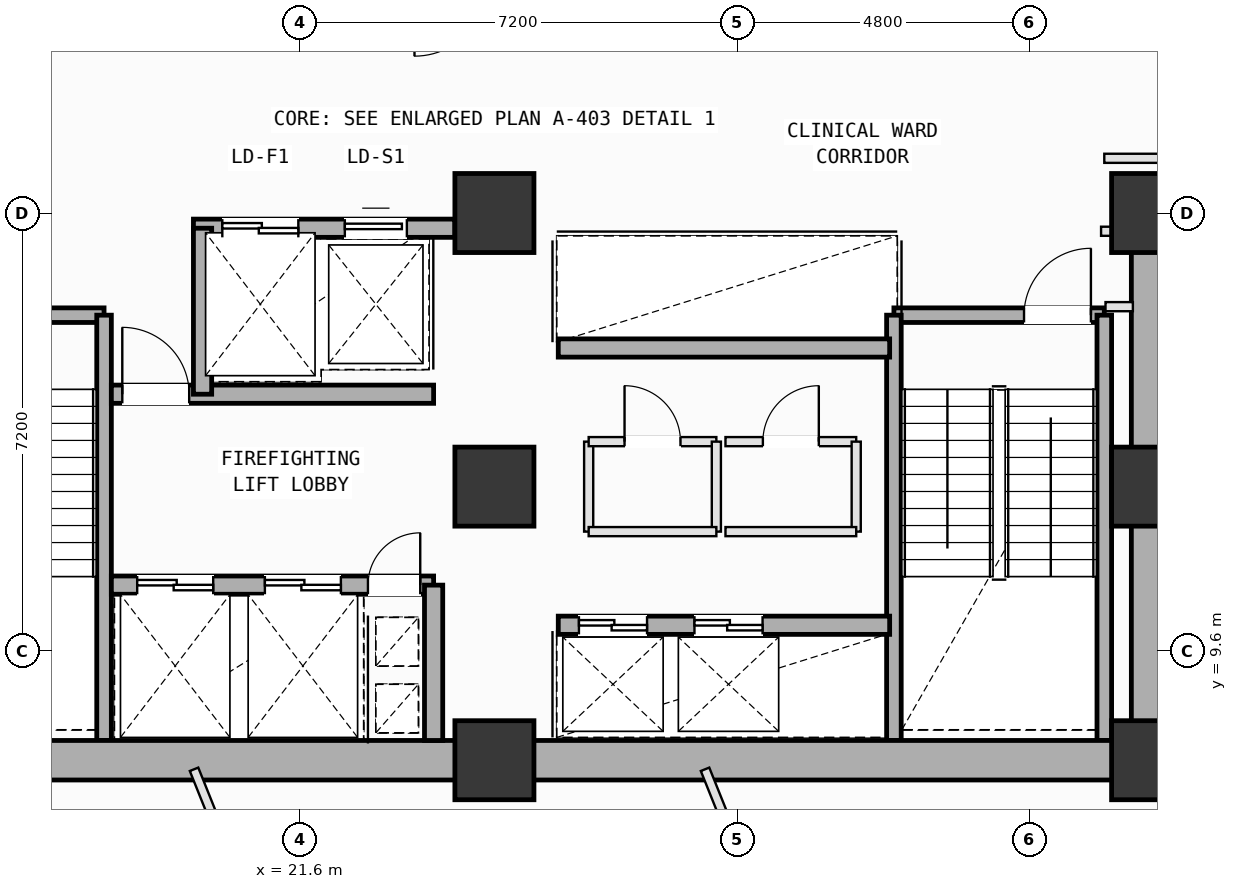
"""IFC4 building model, lengths in metres.
Left out: names, types, materials, properties, quantities, classifications, styles, units other than length and angle.
Written with IfcOpenShell. Run it as: python <this file> out.ifc"""

import sys

from ifc_helpers import new_model, si_unit, direction, frame, frame_2d, origin, origin_2d, place, context, subcontext, project, spatial, rectangle, extrude, element, fill, save


model = new_model("IFC4")
c1 = context("Model", 3, precision=1e-05, world=origin(), true_north=direction((0.0, 1.0)))
c2 = subcontext(c1, "Body", "Model", "MODEL_VIEW")
j1 = project(units=[si_unit("LENGTHUNIT", "METRE"), si_unit("PLANEANGLEUNIT", "RADIAN")], contexts=[c1])
p1 = place(None, origin())
s1 = spatial("IfcSite", under=j1, at=p1, CompositionType="ELEMENT")
p2 = place(p1, origin())
s2 = spatial("IfcBuilding", under=s1, at=p2, CompositionType="ELEMENT")
p3 = place(p2, frame((0.0, 0.0, 116.4)))
s3 = spatial("IfcBuildingStorey", under=s2, at=p3, CompositionType="ELEMENT", Elevation=116.4)
for number, where, z_axis, x_axis in (
    (1, (24.8, 7.8, 0.0), (0.0, 0.0, 1.0), (1.0, 0.0, 0.0)),
    (2, (24.8, 12.3, 0.0), (0.0, 0.0, 1.0), (1.0, 0.0, 0.0)),
    (3, (24.8, 16.8, 0.0), (0.0, 0.0, 1.0), (1.0, 0.0, 0.0)),
    (4, (35.6, 7.8, 0.0), (0.0, 0.0, 1.0), (1.0, 0.0, 0.0)),
    (5, (35.6, 12.3, 0.0), (0.0, 0.0, 1.0), (1.0, 0.0, 0.0)),
    (6, (35.6, 16.8, 0.0), (0.0, 0.0, 1.0), (1.0, 0.0, 0.0)),
):
    element("IfcColumn", number, at=place(p3, frame(where, z_axis=z_axis, x_axis=x_axis)), inside=s3, PredefinedType="COLUMN", context=c2, shape_type="SweptSolid", body=[
        extrude(rectangle(XDim=1.3, YDim=1.3, at=origin_2d()), origin(), (0.0, 0.0, 1.0), 4.0),
    ])
p4 = place(p3, frame((14.92, 15.12, 0.0), z_axis=(0.0, 0.0, 1.0), x_axis=(1.0, 0.0, 0.0)))
e7 = element("IfcWall", 7, at=p4, inside=s3, PredefinedType="SOLIDWALL", context=c2, shape_type="SweptSolid", body=[
    extrude(rectangle(XDim=3.46, YDim=0.24, at=frame_2d((1.73, 0.0))), origin(), (0.0, 0.0, 1.0), 3.78),
])
p5 = place(p4, frame((0.22, 0.0, 0.0)))
e8 = element("IfcOpeningElement", 8, at=p5, cuts=e7, PredefinedType="OPENING", context=c2, shape_type="SweptSolid", body=[
    extrude(rectangle(XDim=1.1, YDim=2.15, at=frame_2d((0.55, 1.075))), frame((0.0, 0.13, 0.0), z_axis=(0.0, -1.0, 0.0), x_axis=(1.0, 0.0, 0.0)), (0.0, 0.0, 1.0), 0.26),
])
p6 = place(p3, frame((18.38, 15.12, 0.0), z_axis=(0.0, 0.0, 1.0), x_axis=(0.0, -1.0, 0.0)))
e9 = element("IfcWall", 9, at=p6, inside=s3, PredefinedType="SOLIDWALL", context=c2, shape_type="SweptSolid", body=[
    extrude(rectangle(XDim=6.995, YDim=0.24, at=frame_2d((3.498, 0.0))), origin(), (0.0, 0.0, 1.0), 3.78),
])
p7 = place(p3, frame((31.37, 15.12, 0.0), z_axis=(0.0, 0.0, 1.0), x_axis=(1.0, 0.0, 0.0)))
e10 = element("IfcWall", 10, at=p7, inside=s3, PredefinedType="SOLIDWALL", context=c2, shape_type="SweptSolid", body=[
    extrude(rectangle(XDim=3.46, YDim=0.24, at=frame_2d((1.73, 0.0))), origin(), (0.0, 0.0, 1.0), 3.78),
])
p8 = place(p7, frame((2.14, 0.0, 0.0)))
e11 = element("IfcOpeningElement", 11, at=p8, cuts=e10, PredefinedType="OPENING", context=c2, shape_type="SweptSolid", body=[
    extrude(rectangle(XDim=1.1, YDim=2.15, at=frame_2d((0.55, 1.075))), frame((0.0, 0.13, 0.0), z_axis=(0.0, -1.0, 0.0), x_axis=(1.0, 0.0, 0.0)), (0.0, 0.0, 1.0), 0.26),
])
for number, where, z_axis, x_axis in (
    (12, (34.83, 15.12, 0.0), (0.0, 0.0, 1.0), (0.0, -1.0, 0.0)),
    (13, (31.37, 8.125, 0.0), (0.0, 0.0, 1.0), (0.0, 1.0, 0.0)),
):
    element("IfcWall", number, at=place(p3, frame(where, z_axis=z_axis, x_axis=x_axis)), inside=s3, PredefinedType="SOLIDWALL", context=c2, shape_type="SweptSolid", body=[
        extrude(rectangle(XDim=6.995, YDim=0.24, at=frame_2d((3.498, 0.0))), origin(), (0.0, 0.0, 1.0), 3.78),
    ])
for number, where, z_axis, x_axis in (
    (14, (14.0, 7.8, 0.0), (0.0, 0.0, 1.0), (1.0, 0.0, 0.0)),
    (15, (24.8, 7.8, 0.0), (0.0, 0.0, 1.0), (1.0, 0.0, 0.0)),
):
    element("IfcWall", number, at=place(p3, frame(where, z_axis=z_axis, x_axis=x_axis)), inside=s3, PredefinedType="SHEAR", context=c2, shape_type="SweptSolid", body=[
        extrude(rectangle(XDim=10.8, YDim=0.65, at=frame_2d((5.4, 0.0))), origin(), (0.0, 0.0, 1.0), 3.78),
    ])
p9 = place(p3, frame((35.6, 7.8, 0.0), z_axis=(0.0, 0.0, 1.0), x_axis=(0.0, 1.0, 0.0)))
e16 = element("IfcWall", 16, at=p9, inside=s3, PredefinedType="SHEAR", context=c2, shape_type="SweptSolid", body=[
    extrude(rectangle(XDim=9.0, YDim=0.65, at=frame_2d((4.5, 0.0))), origin(), (0.0, 0.0, 1.0), 3.78),
])
p10 = place(p3, frame((19.85, 16.55, 0.0), z_axis=(0.0, 0.0, 1.0), x_axis=(1.0, 0.0, 0.0)))
e17 = element("IfcWall", 17, at=p10, inside=s3, PredefinedType="SOLIDWALL", context=c2, shape_type="SweptSolid", body=[
    extrude(rectangle(XDim=4.3, YDim=0.3, at=frame_2d((2.15, 0.0))), origin(), (0.0, 0.0, 1.0), 3.78),
])
p11 = place(p10, frame((0.475, 0.0, 0.0)))
e18 = element("IfcOpeningElement", 18, at=p11, cuts=e17, PredefinedType="OPENING", context=c2, shape_type="SweptSolid", body=[
    extrude(rectangle(XDim=1.25, YDim=2.18, at=frame_2d((0.625, 1.09))), frame((0.0, 0.16, 0.0), z_axis=(0.0, -1.0, 0.0), x_axis=(1.0, 0.0, 0.0)), (0.0, 0.0, 1.0), 0.32),
])
p12 = place(p10, frame((2.49, 0.0, 0.0)))
e19 = element("IfcOpeningElement", 19, at=p12, cuts=e17, PredefinedType="OPENING", context=c2, shape_type="SweptSolid", body=[
    extrude(rectangle(XDim=1.02, YDim=2.12, at=frame_2d((0.51, 1.06))), frame((0.0, 0.16, 0.0), z_axis=(0.0, -1.0, 0.0), x_axis=(1.0, 0.0, 0.0)), (0.0, 0.0, 1.0), 0.32),
])
p13 = place(p3, frame((18.5, 10.68, 0.0), z_axis=(0.0, 0.0, 1.0), x_axis=(1.0, 0.0, 0.0)))
e20 = element("IfcWall", 20, at=p13, inside=s3, PredefinedType="SOLIDWALL", context=c2, shape_type="SweptSolid", body=[
    extrude(rectangle(XDim=5.3, YDim=0.3, at=frame_2d((2.65, 0.0))), origin(), (0.0, 0.0, 1.0), 3.78),
])
p14 = place(p13, frame((4.22, 0.0, 0.0)))
e21 = element("IfcOpeningElement", 21, at=p14, cuts=e20, PredefinedType="OPENING", context=c2, shape_type="SweptSolid", body=[
    extrude(rectangle(XDim=0.86, YDim=2.06, at=frame_2d((0.43, 1.03))), frame((0.0, 0.16, 0.0), z_axis=(0.0, -1.0, 0.0), x_axis=(1.0, 0.0, 0.0)), (0.0, 0.0, 1.0), 0.32),
])
p15 = place(p13, frame((0.425, 0.0, 0.0)))
e22 = element("IfcOpeningElement", 22, at=p15, cuts=e20, PredefinedType="OPENING", context=c2, shape_type="SweptSolid", body=[
    extrude(rectangle(XDim=1.25, YDim=2.18, at=frame_2d((0.625, 1.09))), frame((0.0, 0.16, 0.0), z_axis=(0.0, -1.0, 0.0), x_axis=(1.0, 0.0, 0.0)), (0.0, 0.0, 1.0), 0.32),
])
p16 = place(p13, frame((2.525, 0.0, 0.0)))
e23 = element("IfcOpeningElement", 23, at=p16, cuts=e20, PredefinedType="OPENING", context=c2, shape_type="SweptSolid", body=[
    extrude(rectangle(XDim=1.25, YDim=2.18, at=frame_2d((0.625, 1.09))), frame((0.0, 0.16, 0.0), z_axis=(0.0, -1.0, 0.0), x_axis=(1.0, 0.0, 0.0)), (0.0, 0.0, 1.0), 0.32),
])
p17 = place(p3, frame((18.5, 13.82, 0.0), z_axis=(0.0, 0.0, 1.0), x_axis=(1.0, 0.0, 0.0)))
e24 = element("IfcWall", 24, at=p17, inside=s3, PredefinedType="SOLIDWALL", context=c2, shape_type="SweptSolid", body=[
    extrude(rectangle(XDim=5.3, YDim=0.3, at=frame_2d((2.65, 0.0))), origin(), (0.0, 0.0, 1.0), 3.78),
])
p18 = place(p17, frame((0.18, 0.0, 0.0)))
e25 = element("IfcOpeningElement", 25, at=p18, cuts=e24, PredefinedType="OPENING", context=c2, shape_type="SweptSolid", body=[
    extrude(rectangle(XDim=1.1, YDim=2.15, at=frame_2d((0.55, 1.075))), frame((0.0, 0.16, 0.0), z_axis=(0.0, -1.0, 0.0), x_axis=(1.0, 0.0, 0.0)), (0.0, 0.0, 1.0), 0.32),
])
p19 = place(p3, frame((23.8, 8.125, 0.0), z_axis=(0.0, 0.0, 1.0), x_axis=(0.0, 1.0, 0.0)))
e26 = element("IfcWall", 26, at=p19, inside=s3, PredefinedType="SOLIDWALL", context=c2, shape_type="SweptSolid", body=[
    extrude(rectangle(XDim=2.555, YDim=0.3, at=frame_2d((1.277, 0.0))), origin(), (0.0, 0.0, 1.0), 3.78),
])
p20 = place(p3, frame((20.0, 13.82, 0.0), z_axis=(0.0, 0.0, 1.0), x_axis=(0.0, 1.0, 0.0)))
e27 = element("IfcWall", 27, at=p20, inside=s3, PredefinedType="SOLIDWALL", context=c2, shape_type="SweptSolid", body=[
    extrude(rectangle(XDim=2.73, YDim=0.3, at=frame_2d((1.365, 0.0))), origin(), (0.0, 0.0, 1.0), 3.78),
])
p21 = place(p3, frame((25.85, 10.02, 0.0), z_axis=(0.0, 0.0, 1.0), x_axis=(1.0, 0.0, 0.0)))
e28 = element("IfcWall", 28, at=p21, inside=s3, PredefinedType="SOLIDWALL", context=c2, shape_type="SweptSolid", body=[
    extrude(rectangle(XDim=5.45, YDim=0.3, at=frame_2d((2.725, 0.0))), origin(), (0.0, 0.0, 1.0), 3.78),
])
p22 = place(p21, frame((0.34, 0.0, 0.0)))
e29 = element("IfcOpeningElement", 29, at=p22, cuts=e28, PredefinedType="OPENING", context=c2, shape_type="SweptSolid", body=[
    extrude(rectangle(XDim=1.12, YDim=2.15, at=frame_2d((0.56, 1.075))), frame((0.0, 0.16, 0.0), z_axis=(0.0, -1.0, 0.0), x_axis=(1.0, 0.0, 0.0)), (0.0, 0.0, 1.0), 0.32),
])
p23 = place(p21, frame((2.24, 0.0, 0.0)))
e30 = element("IfcOpeningElement", 30, at=p23, cuts=e28, PredefinedType="OPENING", context=c2, shape_type="SweptSolid", body=[
    extrude(rectangle(XDim=1.12, YDim=2.15, at=frame_2d((0.56, 1.075))), frame((0.0, 0.16, 0.0), z_axis=(0.0, -1.0, 0.0), x_axis=(1.0, 0.0, 0.0)), (0.0, 0.0, 1.0), 0.32),
])
p24 = place(p3, frame((25.85, 14.58, 0.0), z_axis=(0.0, 0.0, 1.0), x_axis=(1.0, 0.0, 0.0)))
e31 = element("IfcWall", 31, at=p24, inside=s3, PredefinedType="SOLIDWALL", context=c2, shape_type="SweptSolid", body=[
    extrude(rectangle(XDim=5.45, YDim=0.3, at=frame_2d((2.725, 0.0))), origin(), (0.0, 0.0, 1.0), 3.78),
])
p25 = place(p3, frame((26.35, 11.56, 0.0), z_axis=(0.0, 0.0, 1.0), x_axis=(0.0, 1.0, 0.0)))
e32 = element("IfcWall", 32, at=p25, inside=s3, PredefinedType="PARTITIONING", context=c2, shape_type="SweptSolid", body=[
    extrude(rectangle(XDim=1.48, YDim=0.15, at=frame_2d((0.74, 0.0))), origin(), (0.0, 0.0, 1.0), 3.78),
])
p26 = place(p3, frame((26.35, 13.04, 0.0), z_axis=(0.0, 0.0, 1.0), x_axis=(1.0, 0.0, 0.0)))
e33 = element("IfcWall", 33, at=p26, inside=s3, PredefinedType="PARTITIONING", context=c2, shape_type="SweptSolid", body=[
    extrude(rectangle(XDim=2.1, YDim=0.15, at=frame_2d((1.05, 0.0))), origin(), (0.0, 0.0, 1.0), 3.78),
])
p27 = place(p26, frame((0.59, 0.0, 0.0)))
e34 = element("IfcOpeningElement", 34, at=p27, cuts=e33, PredefinedType="OPENING", context=c2, shape_type="SweptSolid", body=[
    extrude(rectangle(XDim=0.92, YDim=2.1, at=frame_2d((0.46, 1.05))), frame((0.0, 0.085, 0.0), z_axis=(0.0, -1.0, 0.0), x_axis=(1.0, 0.0, 0.0)), (0.0, 0.0, 1.0), 0.17),
])
p28 = place(p3, frame((28.45, 13.04, 0.0), z_axis=(0.0, 0.0, 1.0), x_axis=(0.0, -1.0, 0.0)))
e35 = element("IfcWall", 35, at=p28, inside=s3, PredefinedType="PARTITIONING", context=c2, shape_type="SweptSolid", body=[
    extrude(rectangle(XDim=1.48, YDim=0.15, at=frame_2d((0.74, 0.0))), origin(), (0.0, 0.0, 1.0), 3.78),
])
p29 = place(p3, frame((28.45, 11.56, 0.0), z_axis=(0.0, 0.0, 1.0), x_axis=(-1.0, 0.0, 0.0)))
e36 = element("IfcWall", 36, at=p29, inside=s3, PredefinedType="PARTITIONING", context=c2, shape_type="SweptSolid", body=[
    extrude(rectangle(XDim=2.1, YDim=0.15, at=frame_2d((1.05, 0.0))), origin(), (0.0, 0.0, 1.0), 3.78),
])
p30 = place(p3, frame((28.6, 13.04, 0.0), z_axis=(0.0, 0.0, 1.0), x_axis=(1.0, 0.0, 0.0)))
e37 = element("IfcWall", 37, at=p30, inside=s3, PredefinedType="PARTITIONING", context=c2, shape_type="SweptSolid", body=[
    extrude(rectangle(XDim=2.15, YDim=0.15, at=frame_2d((1.075, 0.0))), origin(), (0.0, 0.0, 1.0), 3.78),
])
p31 = place(p30, frame((0.615, 0.0, 0.0)))
e38 = element("IfcOpeningElement", 38, at=p31, cuts=e37, PredefinedType="OPENING", context=c2, shape_type="SweptSolid", body=[
    extrude(rectangle(XDim=0.92, YDim=2.1, at=frame_2d((0.46, 1.05))), frame((0.0, 0.085, 0.0), z_axis=(0.0, -1.0, 0.0), x_axis=(1.0, 0.0, 0.0)), (0.0, 0.0, 1.0), 0.17),
])
p32 = place(p3, frame((30.75, 13.04, 0.0), z_axis=(0.0, 0.0, 1.0), x_axis=(0.0, -1.0, 0.0)))
e39 = element("IfcWall", 39, at=p32, inside=s3, PredefinedType="PARTITIONING", context=c2, shape_type="SweptSolid", body=[
    extrude(rectangle(XDim=1.48, YDim=0.15, at=frame_2d((0.74, 0.0))), origin(), (0.0, 0.0, 1.0), 3.78),
])
p33 = place(p3, frame((30.75, 11.56, 0.0), z_axis=(0.0, 0.0, 1.0), x_axis=(-1.0, 0.0, 0.0)))
e40 = element("IfcWall", 40, at=p33, inside=s3, PredefinedType="PARTITIONING", context=c2, shape_type="SweptSolid", body=[
    extrude(rectangle(XDim=2.15, YDim=0.15, at=frame_2d((1.075, 0.0))), origin(), (0.0, 0.0, 1.0), 3.78),
])
p34 = place(p3, frame((19.86, 7.651, 0.0), z_axis=(0.0, 0.0, 1.0), x_axis=(0.372186898662, -0.928157805798, 0.0)))
e41 = element("IfcWall", 41, at=p34, inside=s3, PredefinedType="PARTITIONING", context=c2, shape_type="SweptSolid", body=[
    extrude(rectangle(XDim=11.312, YDim=0.15, at=frame_2d((5.656, 0.0))), origin(), (0.0, 0.0, 1.0), 3.78),
])
p35 = place(p34, frame((5.388, 0.0, 0.0)))
e42 = element("IfcOpeningElement", 42, at=p35, cuts=e41, PredefinedType="OPENING", context=c2, shape_type="SweptSolid", body=[
    extrude(rectangle(XDim=0.86, YDim=2.06, at=frame_2d((0.43, 1.03))), frame((0.0, 0.085, 0.0), z_axis=(0.0, -1.0, 0.0), x_axis=(1.0, 0.0, 0.0)), (0.0, 0.0, 1.0), 0.17),
])
p36 = place(p3, frame((28.264, 7.651, 0.0), z_axis=(0.0, 0.0, 1.0), x_axis=(0.372208328406, -0.928149212285, 0.0)))
e43 = element("IfcWall", 43, at=p36, inside=s3, PredefinedType="PARTITIONING", context=c2, shape_type="SweptSolid", body=[
    extrude(rectangle(XDim=8.184, YDim=0.15, at=frame_2d((4.092, 0.0))), origin(), (0.0, 0.0, 1.0), 3.78),
])
p37 = place(p36, frame((3.824, 0.0, 0.0)))
e44 = element("IfcOpeningElement", 44, at=p37, cuts=e43, PredefinedType="OPENING", context=c2, shape_type="SweptSolid", body=[
    extrude(rectangle(XDim=0.86, YDim=2.06, at=frame_2d((0.43, 1.03))), frame((0.0, 0.085, 0.0), z_axis=(0.0, -1.0, 0.0), x_axis=(1.0, 0.0, 0.0)), (0.0, 0.0, 1.0), 0.17),
])
p38 = place(p3, frame((35.6, 7.5, 0.0), z_axis=(0.0, 0.0, 1.0), x_axis=(1.0, 0.0, 0.0)))
e45 = element("IfcWall", 45, at=p38, inside=s3, PredefinedType="PARTITIONING", context=c2, shape_type="SweptSolid", body=[
    extrude(rectangle(XDim=0.55, YDim=0.15, at=frame_2d((0.275, 0.0))), origin(), (0.0, 0.0, 1.0), 2.965),
])
p39 = place(p3, frame((34.777, 16.5, 0.0), z_axis=(0.0, 0.0, 1.0), x_axis=(1.0, 0.0, 0.0)))
e46 = element("IfcWall", 46, at=p39, inside=s3, PredefinedType="PARTITIONING", context=c2, shape_type="SweptSolid", body=[
    extrude(rectangle(XDim=0.523, YDim=0.15, at=frame_2d((0.261, 0.0))), origin(), (0.0, 0.0, 1.0), 2.965),
])
p40 = place(p3, frame((36.45, 17.7, 0.0), z_axis=(0.0, 0.0, 1.0), x_axis=(-1.0, 0.0, 0.0)))
e47 = element("IfcWall", 47, at=p40, inside=s3, PredefinedType="PARTITIONING", context=c2, shape_type="SweptSolid", body=[
    extrude(rectangle(XDim=1.62, YDim=0.15, at=frame_2d((0.81, 0.0))), origin(), (0.0, 0.0, 1.0), 3.78),
])
p41 = place(p3, frame((35.3, 15.26, 0.0), z_axis=(0.0, 0.0, 1.0), x_axis=(-1.0, 0.0, 0.0)))
e48 = element("IfcWall", 48, at=p41, inside=s3, PredefinedType="PARTITIONING", context=c2, shape_type="SweptSolid", body=[
    extrude(rectangle(XDim=0.45, YDim=0.15, at=frame_2d((0.225, 0.0))), origin(), (0.0, 0.0, 1.0), 3.78),
])
p42 = place(p8, origin())
e49 = element("IfcDoor", 49, at=p42, inside=s3, OperationType="SINGLE_SWING_RIGHT", PredefinedType="DOOR", context=c2, shape_type="SweptSolid", body=[
    extrude(rectangle(XDim=1.1, YDim=2.15, at=frame_2d((0.55, 1.075))), frame((0.0, 0.025, 0.0), z_axis=(0.0, -1.0, 0.0), x_axis=(1.0, 0.0, 0.0)), (0.0, 0.0, 1.0), 0.05),
])
fill(e11, e49)
p43 = place(p14, origin())
e50 = element("IfcDoor", 50, at=p43, inside=s3, OperationType="SINGLE_SWING_RIGHT", PredefinedType="DOOR", context=c2, shape_type="SweptSolid", body=[
    extrude(rectangle(XDim=0.86, YDim=2.06, at=frame_2d((0.43, 1.03))), frame((0.0, 0.025, 0.0), z_axis=(0.0, -1.0, 0.0), x_axis=(1.0, 0.0, 0.0)), (0.0, 0.0, 1.0), 0.05),
])
fill(e21, e50)
p44 = place(p18, origin())
e51 = element("IfcDoor", 51, at=p44, inside=s3, OperationType="SINGLE_SWING_LEFT", PredefinedType="DOOR", context=c2, shape_type="SweptSolid", body=[
    extrude(rectangle(XDim=1.1, YDim=2.15, at=frame_2d((0.55, 1.075))), frame((0.0, 0.025, 0.0), z_axis=(0.0, -1.0, 0.0), x_axis=(1.0, 0.0, 0.0)), (0.0, 0.0, 1.0), 0.05),
])
fill(e25, e51)
p45 = place(p15, origin())
e52 = element("IfcDoor", 52, at=p45, inside=s3, OperationType="DOUBLE_DOOR_SLIDING", PredefinedType="DOOR", context=c2, shape_type="SweptSolid", body=[
    extrude(rectangle(XDim=1.25, YDim=2.18, at=frame_2d((0.625, 1.09))), frame((0.0, 0.025, 0.0), z_axis=(0.0, -1.0, 0.0), x_axis=(1.0, 0.0, 0.0)), (0.0, 0.0, 1.0), 0.05),
])
fill(e22, e52)
p46 = place(p16, origin())
e53 = element("IfcDoor", 53, at=p46, inside=s3, OperationType="DOUBLE_DOOR_SLIDING", PredefinedType="DOOR", context=c2, shape_type="SweptSolid", body=[
    extrude(rectangle(XDim=1.25, YDim=2.18, at=frame_2d((0.625, 1.09))), frame((0.0, 0.025, 0.0), z_axis=(0.0, -1.0, 0.0), x_axis=(1.0, 0.0, 0.0)), (0.0, 0.0, 1.0), 0.05),
])
fill(e23, e53)
p47 = place(p22, origin())
e54 = element("IfcDoor", 54, at=p47, inside=s3, OperationType="DOUBLE_DOOR_SLIDING", PredefinedType="DOOR", context=c2, shape_type="SweptSolid", body=[
    extrude(rectangle(XDim=1.12, YDim=2.15, at=frame_2d((0.56, 1.075))), frame((0.0, 0.025, 0.0), z_axis=(0.0, -1.0, 0.0), x_axis=(1.0, 0.0, 0.0)), (0.0, 0.0, 1.0), 0.05),
])
fill(e29, e54)
p48 = place(p23, origin())
e55 = element("IfcDoor", 55, at=p48, inside=s3, OperationType="DOUBLE_DOOR_SLIDING", PredefinedType="DOOR", context=c2, shape_type="SweptSolid", body=[
    extrude(rectangle(XDim=1.12, YDim=2.15, at=frame_2d((0.56, 1.075))), frame((0.0, 0.025, 0.0), z_axis=(0.0, -1.0, 0.0), x_axis=(1.0, 0.0, 0.0)), (0.0, 0.0, 1.0), 0.05),
])
fill(e30, e55)
p49 = place(p11, origin())
e56 = element("IfcDoor", 56, at=p49, inside=s3, OperationType="DOUBLE_DOOR_SLIDING", PredefinedType="DOOR", context=c2, shape_type="SweptSolid", body=[
    extrude(rectangle(XDim=1.25, YDim=2.18, at=frame_2d((0.625, 1.09))), frame((0.0, 0.025, 0.0), z_axis=(0.0, -1.0, 0.0), x_axis=(1.0, 0.0, 0.0)), (0.0, 0.0, 1.0), 0.05),
])
fill(e18, e56)
p50 = place(p12, origin())
e57 = element("IfcDoor", 57, at=p50, inside=s3, OperationType="SLIDING_TO_LEFT", PredefinedType="DOOR", context=c2, shape_type="SweptSolid", body=[
    extrude(rectangle(XDim=1.02, YDim=2.12, at=frame_2d((0.51, 1.06))), frame((0.0, 0.025, 0.0), z_axis=(0.0, -1.0, 0.0), x_axis=(1.0, 0.0, 0.0)), (0.0, 0.0, 1.0), 0.05),
])
fill(e19, e57)
p51 = place(p27, origin())
e58 = element("IfcDoor", 58, at=p51, inside=s3, OperationType="SINGLE_SWING_LEFT", PredefinedType="DOOR", context=c2, shape_type="SweptSolid", body=[
    extrude(rectangle(XDim=0.92, YDim=2.1, at=frame_2d((0.46, 1.05))), frame((0.0, 0.025, 0.0), z_axis=(0.0, -1.0, 0.0), x_axis=(1.0, 0.0, 0.0)), (0.0, 0.0, 1.0), 0.05),
])
fill(e34, e58)
p52 = place(p31, origin())
e59 = element("IfcDoor", 59, at=p52, inside=s3, OperationType="SINGLE_SWING_RIGHT", PredefinedType="DOOR", context=c2, shape_type="SweptSolid", body=[
    extrude(rectangle(XDim=0.92, YDim=2.1, at=frame_2d((0.46, 1.05))), frame((0.0, 0.025, 0.0), z_axis=(0.0, -1.0, 0.0), x_axis=(1.0, 0.0, 0.0)), (0.0, 0.0, 1.0), 0.05),
])
fill(e38, e59)
save(model, sys.argv[1])
